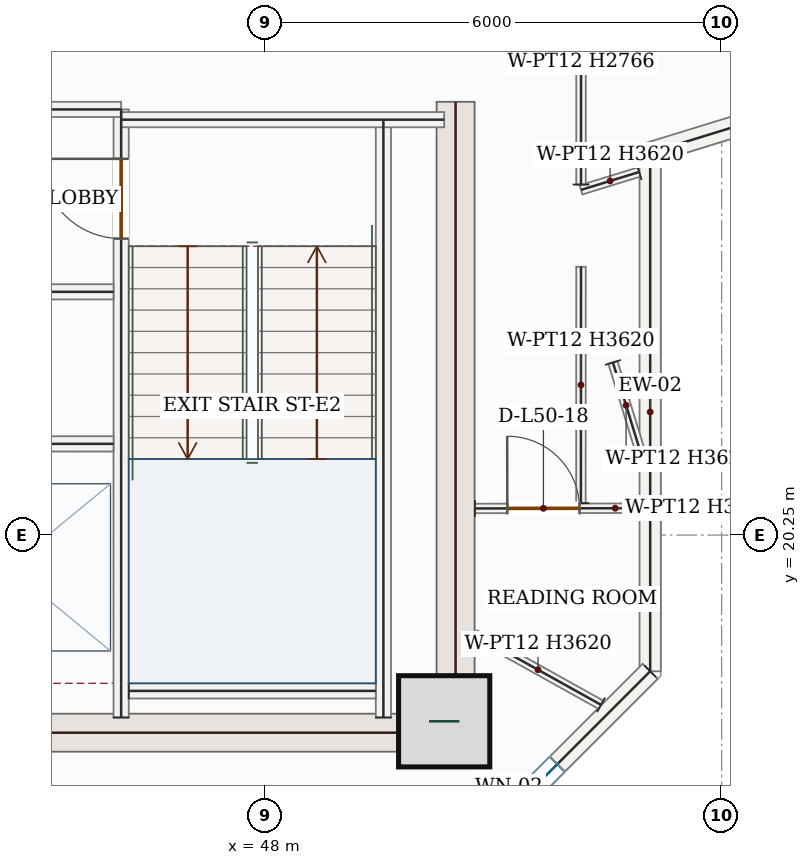
"""IFC4 building model, lengths in metres.
Left out: names, types, materials, properties, quantities, classifications, styles, units other than length and angle.
Written with IfcOpenShell. Run it as: python <this file> out.ifc"""

import sys

from ifc_helpers import new_model, si_unit, direction, frame, frame_2d, origin, origin_2d, place, context, subcontext, project, spatial, rectangle, extrude, source, transform, mapped, element, fill, save


model = new_model("IFC4")
c1 = context("Model", 3, precision=1e-05, world=origin(), true_north=direction((0.0, 1.0)))
c2 = subcontext(c1, "Body", "Model", "MODEL_VIEW")
j1 = project(units=[si_unit("LENGTHUNIT", "METRE"), si_unit("PLANEANGLEUNIT", "RADIAN")], contexts=[c1])
p1 = place(None, origin())
s1 = spatial("IfcSite", under=j1, at=p1, CompositionType="ELEMENT")
p2 = place(p1, origin())
s2 = spatial("IfcBuilding", under=s1, at=p2, CompositionType="ELEMENT")
p3 = place(p2, frame((0.0, 0.0, 213.6)))
s3 = spatial("IfcBuildingStorey", under=s2, at=p3, CompositionType="ELEMENT", Elevation=213.6)
m1 = source(origin(), c2, "Body", "SweptSolid", [
    extrude(rectangle(XDim=8.55, YDim=0.5, at=frame_2d((4.275, 0.0))), origin(), (0.0, 0.0, 1.0), 3.62),
])
p4 = place(p3, frame((50.5, 17.4, 0.0), z_axis=(0.0, 0.0, 1.0), x_axis=(0.0, 1.0, 0.0)))
e1 = element("IfcWall", 1, at=p4, inside=s3, PredefinedType="SHEAR", context=c2, shape_type="MappedRepresentation", body=[
    mapped(m1, transform((0.0, 0.0, 0.0), x_axis=(1.0, 0.0, 0.0), y_axis=(0.0, 1.0, 0.0), z_axis=(0.0, 0.0, 1.0), scale=1.0)),
])
m2 = source(origin(), c2, "Body", "SweptSolid", [
    extrude(rectangle(XDim=7.0, YDim=0.5, at=frame_2d((3.5, 0.0))), origin(), (0.0, 0.0, 1.0), 3.62),
])
p5 = place(p3, frame((43.25, 17.65, 0.0), z_axis=(0.0, 0.0, 1.0), x_axis=(1.0, 0.0, 0.0)))
e2 = element("IfcWall", 2, at=p5, inside=s3, PredefinedType="SHEAR", context=c2, shape_type="MappedRepresentation", body=[
    mapped(m2, transform((0.0, 0.0, 0.0), x_axis=(1.0, 0.0, 0.0), y_axis=(0.0, 1.0, 0.0), z_axis=(0.0, 0.0, 1.0), scale=1.0)),
])
m3 = source(origin(), c2, "Body", "SweptSolid", [
    extrude(rectangle(XDim=1.2, YDim=1.2, at=origin_2d()), origin(), (0.0, 0.0, 1.0), 3.9),
])
p6 = place(p3, frame((50.35, 17.8, 0.0), z_axis=(0.0, 0.0, 1.0), x_axis=(1.0, 0.0, 0.0)))
e3 = element("IfcColumn", 3, at=p6, inside=s3, PredefinedType="COLUMN", context=c2, shape_type="MappedRepresentation", body=[
    mapped(m3, transform((0.0, 0.0, 0.0), x_axis=(1.0, 0.0, 0.0), y_axis=(0.0, 1.0, 0.0), z_axis=(0.0, 0.0, 1.0), scale=1.0)),
])
p7 = place(p3, frame((57.418, 26.621, 0.0), z_axis=(0.0, 0.0, 1.0), x_axis=(-0.955788269664, -0.294055749089, 0.0)))
e4 = element("IfcWall", 4, at=p7, inside=s3, PredefinedType="SOLIDWALL", context=c2, shape_type="SweptSolid", body=[
    extrude(rectangle(XDim=4.56, YDim=0.28, at=frame_2d((2.28, 0.0))), origin(), (0.0, 0.0, 1.0), 3.62),
])
p8 = place(p7, frame((1.38, 0.0, 0.85)))
e5 = element("IfcOpeningElement", 5, at=p8, cuts=e4, PredefinedType="OPENING", context=c2, shape_type="SweptSolid", body=[
    extrude(rectangle(XDim=1.8, YDim=1.75, at=frame_2d((0.9, 0.875))), frame((0.0, 0.15, 0.0), z_axis=(0.0, -1.0, 0.0), x_axis=(1.0, 0.0, 0.0)), (0.0, 0.0, 1.0), 0.3),
])
m4 = source(origin(), c2, "Body", "SweptSolid", [
    extrude(rectangle(XDim=6.822, YDim=0.28, at=frame_2d((3.411, 0.0))), origin(), (0.0, 0.0, 1.0), 3.62),
])
p9 = place(p3, frame((53.06, 25.28, 0.0), z_axis=(0.0, 0.0, 1.0), x_axis=(0.0, -1.0, 0.0)))
e6 = element("IfcWall", 6, at=p9, inside=s3, PredefinedType="SOLIDWALL", context=c2, shape_type="MappedRepresentation", body=[
    mapped(m4, transform((0.0, 0.0, 0.0), x_axis=(1.0, 0.0, 0.0), y_axis=(0.0, 1.0, 0.0), z_axis=(0.0, 0.0, 1.0), scale=1.0)),
])
p10 = place(p3, frame((53.06, 18.458, 0.0), z_axis=(0.0, 0.0, 1.0), x_axis=(-0.707106781187, -0.707106781187, 0.0)))
e7 = element("IfcWall", 7, at=p10, inside=s3, PredefinedType="SOLIDWALL", context=c2, shape_type="SweptSolid", body=[
    extrude(rectangle(XDim=5.258, YDim=0.28, at=frame_2d((2.629, 0.0))), origin(), (0.0, 0.0, 1.0), 3.62),
])
p11 = place(p10, frame((1.729, 0.0, 0.85)))
e8 = element("IfcOpeningElement", 8, at=p11, cuts=e7, PredefinedType="OPENING", context=c2, shape_type="SweptSolid", body=[
    extrude(rectangle(XDim=1.8, YDim=1.75, at=frame_2d((0.9, 0.875))), frame((0.0, 0.15, 0.0), z_axis=(0.0, -1.0, 0.0), x_axis=(1.0, 0.0, 0.0)), (0.0, 0.0, 1.0), 0.3),
])
m5 = source(origin(), c2, "Body", "SweptSolid", [
    extrude(rectangle(XDim=7.87, YDim=0.2, at=frame_2d((3.935, 0.0))), origin(), (0.0, 0.0, 1.0), 3.62),
])
p12 = place(p3, frame((49.55, 17.85, 0.0), z_axis=(0.0, 0.0, 1.0), x_axis=(0.0, 1.0, 0.0)))
e9 = element("IfcWall", 9, at=p12, inside=s3, PredefinedType="SOLIDWALL", context=c2, shape_type="MappedRepresentation", body=[
    mapped(m5, transform((0.0, 0.0, 0.0), x_axis=(1.0, 0.0, 0.0), y_axis=(0.0, 1.0, 0.0), z_axis=(0.0, 0.0, 1.0), scale=1.0)),
])
p13 = place(p3, frame((46.1, 17.85, 0.0), z_axis=(0.0, 0.0, 1.0), x_axis=(0.0, 1.0, 0.0)))
e10 = element("IfcWall", 10, at=p13, inside=s3, PredefinedType="SOLIDWALL", context=c2, shape_type="SweptSolid", body=[
    extrude(rectangle(XDim=8.0, YDim=0.2, at=frame_2d((4.0, 0.0))), origin(), (0.0, 0.0, 1.0), 3.62),
])
p14 = place(p13, frame((6.3, 0.0, 0.0)))
e11 = element("IfcOpeningElement", 11, at=p14, cuts=e10, PredefinedType="OPENING", context=c2, shape_type="SweptSolid", body=[
    extrude(rectangle(XDim=1.05, YDim=2.15, at=frame_2d((0.525, 1.075))), frame((0.0, 0.11, 0.0), z_axis=(0.0, -1.0, 0.0), x_axis=(1.0, 0.0, 0.0)), (0.0, 0.0, 1.0), 0.22),
])
m6 = source(origin(), c2, "Body", "SweptSolid", [
    extrude(rectangle(XDim=3.0, YDim=0.2, at=frame_2d((1.5, 0.0))), origin(), (0.0, 0.0, 1.0), 3.62),
])
p15 = place(p3, frame((43.1, 25.85, 0.0), z_axis=(0.0, 0.0, 1.0), x_axis=(1.0, 0.0, 0.0)))
e12 = element("IfcWall", 12, at=p15, inside=s3, PredefinedType="SOLIDWALL", context=c2, shape_type="MappedRepresentation", body=[
    mapped(m6, transform((0.0, 0.0, 0.0), x_axis=(1.0, 0.0, 0.0), y_axis=(0.0, 1.0, 0.0), z_axis=(0.0, 0.0, 1.0), scale=1.0)),
])
m7 = source(origin(), c2, "Body", "SweptSolid", [
    extrude(rectangle(XDim=4.25, YDim=0.2, at=frame_2d((2.125, 0.0))), origin(), (0.0, 0.0, 1.0), 3.62),
])
p16 = place(p3, frame((46.1, 25.715, 0.0), z_axis=(0.0, 0.0, 1.0), x_axis=(1.0, 0.0, 0.0)))
e13 = element("IfcWall", 13, at=p16, inside=s3, PredefinedType="SOLIDWALL", context=c2, shape_type="MappedRepresentation", body=[
    mapped(m7, transform((0.0, 0.0, 0.0), x_axis=(1.0, 0.0, 0.0), y_axis=(0.0, 1.0, 0.0), z_axis=(0.0, 0.0, 1.0), scale=1.0)),
])
m8 = source(origin(), c2, "Body", "SweptSolid", [
    extrude(rectangle(XDim=3.25, YDim=0.2, at=frame_2d((1.625, 0.0))), origin(), (0.0, 0.0, 1.0), 3.62),
])
p17 = place(p3, frame((46.2, 18.2, 0.0), z_axis=(0.0, 0.0, 1.0), x_axis=(1.0, 0.0, 0.0)))
e14 = element("IfcWall", 14, at=p17, inside=s3, PredefinedType="SOLIDWALL", context=c2, shape_type="MappedRepresentation", body=[
    mapped(m8, transform((0.0, 0.0, 0.0), x_axis=(1.0, 0.0, 0.0), y_axis=(0.0, 1.0, 0.0), z_axis=(0.0, 0.0, 1.0), scale=1.0)),
])
m9 = source(origin(), c2, "Body", "SweptSolid", [
    extrude(rectangle(XDim=2.75, YDim=0.2, at=frame_2d((1.375, 0.0))), origin(), (0.0, 0.0, 1.0), 3.62),
])
for number, where, z_axis, x_axis in (
    (15, (43.25, 23.45, 0.0), (0.0, 0.0, 1.0), (1.0, 0.0, 0.0)),
    (16, (43.25, 21.45, 0.0), (0.0, 0.0, 1.0), (1.0, 0.0, 0.0)),
):
    element("IfcWall", number, at=place(p3, frame(where, z_axis=z_axis, x_axis=x_axis)), inside=s3, PredefinedType="SOLIDWALL", context=c2, shape_type="MappedRepresentation", body=[
        mapped(m9, transform((0.0, 0.0, 0.0), x_axis=(1.0, 0.0, 0.0), y_axis=(0.0, 1.0, 0.0), z_axis=(0.0, 0.0, 1.0), scale=1.0)),
    ])
p18 = place(p3, frame((50.755, 20.6, 0.0), z_axis=(0.0, 0.0, 1.0), x_axis=(0.99999875384, 0.001578708001, 0.0)))
e17 = element("IfcWall", 17, at=p18, inside=s3, PredefinedType="PARTITIONING", context=c2, shape_type="SweptSolid", body=[
    extrude(rectangle(XDim=2.165, YDim=0.125, at=frame_2d((1.083, 0.0))), origin(), (0.0, 0.0, 1.0), 3.62),
])
p19 = place(p18, frame((0.425, 0.0, 0.0)))
e18 = element("IfcOpeningElement", 18, at=p19, cuts=e17, PredefinedType="OPENING", context=c2, shape_type="SweptSolid", body=[
    extrude(rectangle(XDim=0.95, YDim=2.15, at=frame_2d((0.475, 1.075))), frame((0.0, 0.073, 0.0), z_axis=(0.0, -1.0, 0.0), x_axis=(1.0, 0.0, 0.0)), (0.0, 0.0, 1.0), 0.145),
])
m10 = source(origin(), c2, "Body", "SweptSolid", [
    extrude(rectangle(XDim=3.11, YDim=0.125, at=frame_2d((1.555, 0.0))), origin(), (0.0, 0.0, 1.0), 3.62),
])
p20 = place(p3, frame((52.149, 20.67, 0.0), z_axis=(0.0, 0.0, 1.0), x_axis=(0.000392526269, 0.999999922962, 0.0)))
e19 = element("IfcWall", 19, at=p20, inside=s3, PredefinedType="PARTITIONING", context=c2, shape_type="MappedRepresentation", body=[
    mapped(m10, transform((0.0, 0.0, 0.0), x_axis=(1.0, 0.0, 0.0), y_axis=(0.0, 1.0, 0.0), z_axis=(0.0, 0.0, 1.0), scale=1.0)),
])
m11 = source(origin(), c2, "Body", "SweptSolid", [
    extrude(rectangle(XDim=1.18, YDim=0.125, at=frame_2d((0.59, 0.0))), origin(), (0.0, 0.0, 1.0), 3.62),
])
p21 = place(p3, frame((52.57, 22.521, 0.0), z_axis=(0.0, 0.0, 1.0), x_axis=(0.293984081944, -0.955810315682, 0.0)))
e20 = element("IfcWall", 20, at=p21, inside=s3, PredefinedType="PARTITIONING", context=c2, shape_type="MappedRepresentation", body=[
    mapped(m11, transform((0.0, 0.0, 0.0), x_axis=(1.0, 0.0, 0.0), y_axis=(0.0, 1.0, 0.0), z_axis=(0.0, 0.0, 1.0), scale=1.0)),
])
m12 = source(origin(), c2, "Body", "SweptSolid", [
    extrude(rectangle(XDim=1.898, YDim=0.125, at=frame_2d((0.949, 0.0))), origin(), (0.0, 0.0, 1.0), 3.62),
])
p22 = place(p3, frame((52.414, 18.017, 0.0), z_axis=(0.0, 0.0, 1.0), x_axis=(-0.873799105313, 0.486287079362, 0.0)))
e21 = element("IfcWall", 21, at=p22, inside=s3, PredefinedType="PARTITIONING", context=c2, shape_type="MappedRepresentation", body=[
    mapped(m12, transform((0.0, 0.0, 0.0), x_axis=(1.0, 0.0, 0.0), y_axis=(0.0, 1.0, 0.0), z_axis=(0.0, 0.0, 1.0), scale=1.0)),
])
m13 = source(origin(), c2, "Body", "SweptSolid", [
    extrude(rectangle(XDim=0.801, YDim=0.125, at=frame_2d((0.4, 0.0))), origin(), (0.0, 0.0, 1.0), 3.62),
])
p23 = place(p3, frame((52.915, 25.026, 0.0), z_axis=(0.0, 0.0, 1.0), x_axis=(-0.955805381473, -0.29400012372, 0.0)))
e22 = element("IfcWall", 22, at=p23, inside=s3, PredefinedType="PARTITIONING", context=c2, shape_type="MappedRepresentation", body=[
    mapped(m13, transform((0.0, 0.0, 0.0), x_axis=(1.0, 0.0, 0.0), y_axis=(0.0, 1.0, 0.0), z_axis=(0.0, 0.0, 1.0), scale=1.0)),
])
p24 = place(p3, frame((52.15, 24.862, 0.0), z_axis=(0.0, 0.0, 1.0), x_axis=(0.0, 1.0, 0.0)))
e23 = element("IfcWall", 23, at=p24, inside=s3, PredefinedType="PARTITIONING", context=c2, shape_type="SweptSolid", body=[
    extrude(rectangle(XDim=6.144, YDim=0.125, at=frame_2d((3.072, 0.0))), origin(), (0.0, 0.0, 1.0), 2.766),
])
p25 = place(p24, frame((4.052, 0.0, 0.0)))
e24 = element("IfcOpeningElement", 24, at=p25, cuts=e23, PredefinedType="OPENING", context=c2, shape_type="SweptSolid", body=[
    extrude(rectangle(XDim=0.95, YDim=2.15, at=frame_2d((0.475, 1.075))), frame((0.0, 0.073, 0.0), z_axis=(0.0, -1.0, 0.0), x_axis=(1.0, 0.0, 0.0)), (0.0, 0.0, 1.0), 0.145),
])
m14 = source(origin(), c2, "Body", "SweptSolid", [
    extrude(rectangle(XDim=1.8, YDim=1.75, at=frame_2d((0.9, 0.875))), frame((0.0, 0.03, 0.0), z_axis=(0.0, -1.0, 0.0), x_axis=(1.0, 0.0, 0.0)), (0.0, 0.0, 1.0), 0.06),
])
p26 = place(p11, origin())
e25 = element("IfcWindow", 25, at=p26, inside=s3, PartitioningType="DOUBLE_PANEL_VERTICAL", PredefinedType="WINDOW", context=c2, shape_type="MappedRepresentation", body=[
    mapped(m14, transform((0.0, 0.0, 0.0), x_axis=(1.0, 0.0, 0.0), y_axis=(0.0, 1.0, 0.0), z_axis=(0.0, 0.0, 1.0), scale=1.0)),
])
fill(e8, e25)
m15 = source(origin(), c2, "Body", "SweptSolid", [
    extrude(rectangle(XDim=1.05, YDim=2.15, at=frame_2d((0.525, 1.075))), frame((0.0, 0.025, 0.0), z_axis=(0.0, -1.0, 0.0), x_axis=(1.0, 0.0, 0.0)), (0.0, 0.0, 1.0), 0.05),
])
p27 = place(p14, origin())
e26 = element("IfcDoor", 26, at=p27, inside=s3, OperationType="SINGLE_SWING_RIGHT", PredefinedType="DOOR", context=c2, shape_type="MappedRepresentation", body=[
    mapped(m15, transform((0.0, 0.0, 0.0), x_axis=(1.0, 0.0, 0.0), y_axis=(0.0, 1.0, 0.0), z_axis=(0.0, 0.0, 1.0), scale=1.0)),
])
fill(e11, e26)
m16 = source(origin(), c2, "Body", "SweptSolid", [
    extrude(rectangle(XDim=0.95, YDim=2.15, at=frame_2d((0.475, 1.075))), frame((0.0, 0.025, 0.0), z_axis=(0.0, -1.0, 0.0), x_axis=(1.0, 0.0, 0.0)), (0.0, 0.0, 1.0), 0.05),
])
p28 = place(p19, origin())
e27 = element("IfcDoor", 27, at=p28, inside=s3, OperationType="SINGLE_SWING_LEFT", PredefinedType="DOOR", context=c2, shape_type="MappedRepresentation", body=[
    mapped(m16, transform((0.0, 0.0, 0.0), x_axis=(1.0, 0.0, 0.0), y_axis=(0.0, 1.0, 0.0), z_axis=(0.0, 0.0, 1.0), scale=1.0)),
])
fill(e18, e27)
save(model, sys.argv[1])
